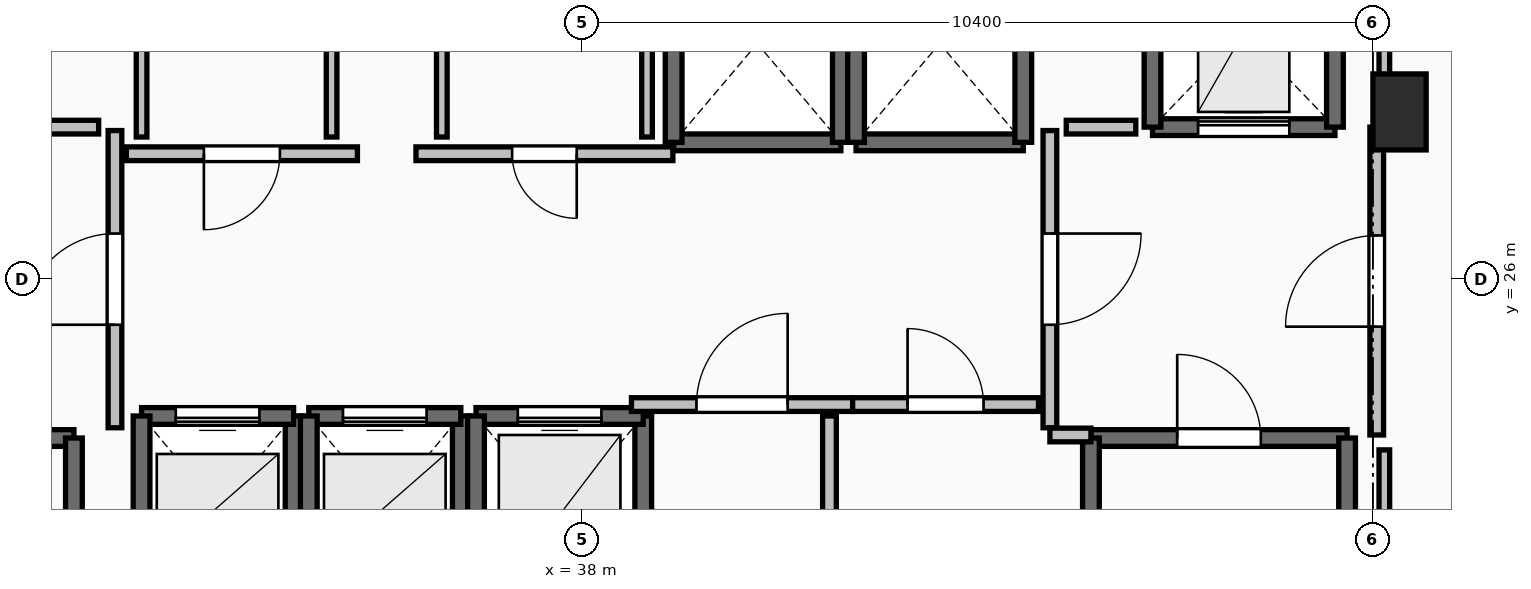
"""IFC4 building model, lengths in metres.
Left out: names, types, materials, properties, quantities, classifications, styles, units other than length and angle.
Written with IfcOpenShell. Run it as: python <this file> out.ifc"""

import sys

from ifc_helpers import new_model, si_unit, direction, frame, frame_2d, origin, origin_2d, place, context, subcontext, project, spatial, rectangle, extrude, element, fill, save


model = new_model("IFC4")
c1 = context("Model", 3, precision=1e-05, world=origin(), true_north=direction((0.0, 1.0)))
c2 = subcontext(c1, "Body", "Model", "MODEL_VIEW")
j1 = project(units=[si_unit("LENGTHUNIT", "METRE"), si_unit("PLANEANGLEUNIT", "RADIAN")], contexts=[c1])
p1 = place(None, origin())
s1 = spatial("IfcSite", under=j1, at=p1, CompositionType="ELEMENT")
p2 = place(p1, origin())
s2 = spatial("IfcBuilding", under=s1, at=p2, CompositionType="ELEMENT")
p3 = place(p2, frame((0.0, 0.0, 186.1)))
s3 = spatial("IfcBuildingStorey", under=s2, at=p3, CompositionType="ELEMENT", Elevation=186.1)
p4 = place(p3, frame((48.75, 28.2, 0.0), z_axis=(0.0, 0.0, 1.0), x_axis=(1.0, 0.0, 0.0)))
e1 = element("IfcColumn", 1, at=p4, inside=s3, PredefinedType="PILASTER", context=c2, shape_type="SweptSolid", body=[
    extrude(rectangle(XDim=0.7, YDim=1.0, at=origin_2d()), origin(), (0.0, 0.0, 1.0), 3.5),
])
p5 = place(p3, frame((27.94, 23.91, 0.0), z_axis=(0.0, 0.0, 1.0), x_axis=(1.0, 0.0, 0.0)))
e2 = element("IfcWall", 2, at=p5, inside=s3, PredefinedType="SOLIDWALL", context=c2, shape_type="SweptSolid", body=[
    extrude(rectangle(XDim=3.37, YDim=0.22, at=frame_2d((1.685, 0.0))), origin(), (0.0, 0.0, 1.0), 3.24),
])
p6 = place(p5, frame((1.135, 0.0, 0.0)))
e3 = element("IfcOpeningElement", 3, at=p6, cuts=e2, PredefinedType="OPENING", context=c2, shape_type="SweptSolid", body=[
    extrude(rectangle(XDim=1.1, YDim=2.15, at=frame_2d((0.55, 1.075))), frame((0.0, 0.125, 0.0), z_axis=(0.0, -1.0, 0.0), x_axis=(1.0, 0.0, 0.0)), (0.0, 0.0, 1.0), 0.25),
])
p7 = place(p3, frame((31.31, 23.91, 0.0), z_axis=(0.0, 0.0, 1.0), x_axis=(0.0, -1.0, 0.0)))
e4 = element("IfcWall", 4, at=p7, inside=s3, PredefinedType="SOLIDWALL", context=c2, shape_type="SweptSolid", body=[
    extrude(rectangle(XDim=7.42, YDim=0.22, at=frame_2d((3.71, 0.0))), origin(), (0.0, 0.0, 1.0), 3.24),
])
p8 = place(p3, frame((44.69, 23.91, 0.0), z_axis=(0.0, 0.0, 1.0), x_axis=(1.0, 0.0, 0.0)))
e5 = element("IfcWall", 5, at=p8, inside=s3, PredefinedType="SOLIDWALL", context=c2, shape_type="SweptSolid", body=[
    extrude(rectangle(XDim=3.37, YDim=0.22, at=frame_2d((1.685, 0.0))), origin(), (0.0, 0.0, 1.0), 3.24),
])
p9 = place(p8, frame((1.135, 0.0, 0.0)))
e6 = element("IfcOpeningElement", 6, at=p9, cuts=e5, PredefinedType="OPENING", context=c2, shape_type="SweptSolid", body=[
    extrude(rectangle(XDim=1.1, YDim=2.15, at=frame_2d((0.55, 1.075))), frame((0.0, 0.125, 0.0), z_axis=(0.0, -1.0, 0.0), x_axis=(1.0, 0.0, 0.0)), (0.0, 0.0, 1.0), 0.25),
])
for number, where, z_axis, x_axis in (
    (7, (48.06, 23.91, 0.0), (0.0, 0.0, 1.0), (0.0, -1.0, 0.0)),
    (8, (44.69, 16.49, 0.0), (0.0, 0.0, 1.0), (0.0, 1.0, 0.0)),
):
    element("IfcWall", number, at=place(p3, frame(where, z_axis=z_axis, x_axis=x_axis)), inside=s3, PredefinedType="SOLIDWALL", context=c2, shape_type="SweptSolid", body=[
        extrude(rectangle(XDim=7.42, YDim=0.22, at=frame_2d((3.71, 0.0))), origin(), (0.0, 0.0, 1.0), 3.24),
    ])
p10 = place(p3, frame((34.2, 21.8, 0.0), z_axis=(0.0, 0.0, 1.0), x_axis=(0.0, 1.0, 0.0)))
e9 = element("IfcWall", 9, at=p10, inside=s3, PredefinedType="SOLIDWALL", context=c2, shape_type="SweptSolid", body=[
    extrude(rectangle(XDim=2.4, YDim=0.22, at=frame_2d((1.2, 0.0))), origin(), (0.0, 0.0, 1.0), 3.24),
])
p11 = place(p3, frame((34.2, 24.2, 0.0), z_axis=(0.0, 0.0, 1.0), x_axis=(-1.0, 0.0, 0.0)))
e10 = element("IfcWall", 10, at=p11, inside=s3, PredefinedType="SOLIDWALL", context=c2, shape_type="SweptSolid", body=[
    extrude(rectangle(XDim=2.0, YDim=0.22, at=frame_2d((1.0, 0.0))), origin(), (0.0, 0.0, 1.0), 3.24),
])
p12 = place(p11, frame((0.45, 0.0, 0.0)))
e11 = element("IfcOpeningElement", 11, at=p12, cuts=e10, PredefinedType="OPENING", context=c2, shape_type="SweptSolid", body=[
    extrude(rectangle(XDim=1.1, YDim=2.2, at=frame_2d((0.55, 1.1))), frame((0.0, 0.125, 0.0), z_axis=(0.0, -1.0, 0.0), x_axis=(1.0, 0.0, 0.0)), (0.0, 0.0, 1.0), 0.25),
])
for number, where, z_axis, x_axis in (
    (12, (32.2, 24.2, 0.0), (0.0, 0.0, 1.0), (0.0, -1.0, 0.0)),
    (13, (36.4, 21.8, 0.0), (0.0, 0.0, 1.0), (0.0, 1.0, 0.0)),
):
    element("IfcWall", number, at=place(p3, frame(where, z_axis=z_axis, x_axis=x_axis)), inside=s3, PredefinedType="SOLIDWALL", context=c2, shape_type="SweptSolid", body=[
        extrude(rectangle(XDim=2.4, YDim=0.22, at=frame_2d((1.2, 0.0))), origin(), (0.0, 0.0, 1.0), 3.24),
    ])
p13 = place(p3, frame((36.4, 24.2, 0.0), z_axis=(0.0, 0.0, 1.0), x_axis=(-1.0, 0.0, 0.0)))
e14 = element("IfcWall", 14, at=p13, inside=s3, PredefinedType="SOLIDWALL", context=c2, shape_type="SweptSolid", body=[
    extrude(rectangle(XDim=2.0, YDim=0.22, at=frame_2d((1.0, 0.0))), origin(), (0.0, 0.0, 1.0), 3.24),
])
p14 = place(p13, frame((0.45, 0.0, 0.0)))
e15 = element("IfcOpeningElement", 15, at=p14, cuts=e14, PredefinedType="OPENING", context=c2, shape_type="SweptSolid", body=[
    extrude(rectangle(XDim=1.1, YDim=2.2, at=frame_2d((0.55, 1.1))), frame((0.0, 0.125, 0.0), z_axis=(0.0, -1.0, 0.0), x_axis=(1.0, 0.0, 0.0)), (0.0, 0.0, 1.0), 0.25),
])
p15 = place(p3, frame((34.4, 24.2, 0.0), z_axis=(0.0, 0.0, 1.0), x_axis=(0.0, -1.0, 0.0)))
e16 = element("IfcWall", 16, at=p15, inside=s3, PredefinedType="SOLIDWALL", context=c2, shape_type="SweptSolid", body=[
    extrude(rectangle(XDim=2.4, YDim=0.22, at=frame_2d((1.2, 0.0))), origin(), (0.0, 0.0, 1.0), 3.24),
])
p16 = place(p3, frame((38.8, 21.6, 0.0), z_axis=(0.0, 0.0, 1.0), x_axis=(0.0, 1.0, 0.0)))
e17 = element("IfcWall", 17, at=p16, inside=s3, PredefinedType="SOLIDWALL", context=c2, shape_type="SweptSolid", body=[
    extrude(rectangle(XDim=2.6, YDim=0.22, at=frame_2d((1.3, 0.0))), origin(), (0.0, 0.0, 1.0), 3.24),
])
p17 = place(p3, frame((38.8, 24.2, 0.0), z_axis=(0.0, 0.0, 1.0), x_axis=(-1.0, 0.0, 0.0)))
e18 = element("IfcWall", 18, at=p17, inside=s3, PredefinedType="SOLIDWALL", context=c2, shape_type="SweptSolid", body=[
    extrude(rectangle(XDim=2.2, YDim=0.22, at=frame_2d((1.1, 0.0))), origin(), (0.0, 0.0, 1.0), 3.24),
])
p18 = place(p17, frame((0.55, 0.0, 0.0)))
e19 = element("IfcOpeningElement", 19, at=p18, cuts=e18, PredefinedType="OPENING", context=c2, shape_type="SweptSolid", body=[
    extrude(rectangle(XDim=1.1, YDim=2.2, at=frame_2d((0.55, 1.1))), frame((0.0, 0.125, 0.0), z_axis=(0.0, -1.0, 0.0), x_axis=(1.0, 0.0, 0.0)), (0.0, 0.0, 1.0), 0.25),
])
p19 = place(p3, frame((36.6, 24.2, 0.0), z_axis=(0.0, 0.0, 1.0), x_axis=(0.0, -1.0, 0.0)))
e20 = element("IfcWall", 20, at=p19, inside=s3, PredefinedType="SOLIDWALL", context=c2, shape_type="SweptSolid", body=[
    extrude(rectangle(XDim=2.6, YDim=0.22, at=frame_2d((1.3, 0.0))), origin(), (0.0, 0.0, 1.0), 3.24),
])
p20 = place(p3, frame((39.2, 27.8, 0.0), z_axis=(0.0, 0.0, 1.0), x_axis=(1.0, 0.0, 0.0)))
e21 = element("IfcWall", 21, at=p20, inside=s3, PredefinedType="SOLIDWALL", context=c2, shape_type="SweptSolid", body=[
    extrude(rectangle(XDim=2.2, YDim=0.22, at=frame_2d((1.1, 0.0))), origin(), (0.0, 0.0, 1.0), 3.24),
])
for number, where, z_axis, x_axis in (
    (22, (41.4, 27.8, 0.0), (0.0, 0.0, 1.0), (0.0, 1.0, 0.0)),
    (23, (39.2, 30.4, 0.0), (0.0, 0.0, 1.0), (0.0, -1.0, 0.0)),
):
    element("IfcWall", number, at=place(p3, frame(where, z_axis=z_axis, x_axis=x_axis)), inside=s3, PredefinedType="SOLIDWALL", context=c2, shape_type="SweptSolid", body=[
        extrude(rectangle(XDim=2.6, YDim=0.22, at=frame_2d((1.3, 0.0))), origin(), (0.0, 0.0, 1.0), 3.24),
    ])
p21 = place(p3, frame((41.6, 27.8, 0.0), z_axis=(0.0, 0.0, 1.0), x_axis=(1.0, 0.0, 0.0)))
e24 = element("IfcWall", 24, at=p21, inside=s3, PredefinedType="SOLIDWALL", context=c2, shape_type="SweptSolid", body=[
    extrude(rectangle(XDim=2.2, YDim=0.22, at=frame_2d((1.1, 0.0))), origin(), (0.0, 0.0, 1.0), 3.24),
])
for number, where, z_axis, x_axis in (
    (25, (43.8, 27.8, 0.0), (0.0, 0.0, 1.0), (0.0, 1.0, 0.0)),
    (26, (41.6, 30.4, 0.0), (0.0, 0.0, 1.0), (0.0, -1.0, 0.0)),
):
    element("IfcWall", number, at=place(p3, frame(where, z_axis=z_axis, x_axis=x_axis)), inside=s3, PredefinedType="SOLIDWALL", context=c2, shape_type="SweptSolid", body=[
        extrude(rectangle(XDim=2.6, YDim=0.22, at=frame_2d((1.3, 0.0))), origin(), (0.0, 0.0, 1.0), 3.24),
    ])
p22 = place(p3, frame((45.5, 28.0, 0.0), z_axis=(0.0, 0.0, 1.0), x_axis=(1.0, 0.0, 0.0)))
e27 = element("IfcWall", 27, at=p22, inside=s3, PredefinedType="SHEAR", context=c2, shape_type="SweptSolid", body=[
    extrude(rectangle(XDim=2.4, YDim=0.22, at=frame_2d((1.2, 0.0))), origin(), (0.0, 0.0, 1.0), 3.24),
])
p23 = place(p22, frame((0.6, 0.0, 0.0)))
e28 = element("IfcOpeningElement", 28, at=p23, cuts=e27, PredefinedType="OPENING", context=c2, shape_type="SweptSolid", body=[
    extrude(rectangle(XDim=1.2, YDim=2.2, at=frame_2d((0.6, 1.1))), frame((0.0, 0.125, 0.0), z_axis=(0.0, -1.0, 0.0), x_axis=(1.0, 0.0, 0.0)), (0.0, 0.0, 1.0), 0.25),
])
for number, where, z_axis, x_axis in (
    (29, (47.9, 28.0, 0.0), (0.0, 0.0, 1.0), (0.0, 1.0, 0.0)),
    (30, (45.5, 30.5, 0.0), (0.0, 0.0, 1.0), (0.0, -1.0, 0.0)),
):
    element("IfcWall", number, at=place(p3, frame(where, z_axis=z_axis, x_axis=x_axis)), inside=s3, PredefinedType="SHEAR", context=c2, shape_type="SweptSolid", body=[
        extrude(rectangle(XDim=2.5, YDim=0.22, at=frame_2d((1.25, 0.0))), origin(), (0.0, 0.0, 1.0), 3.24),
    ])
p24 = place(p3, frame((31.85, 24.045, 0.0), z_axis=(0.0, 0.0, 1.0), x_axis=(0.0, 1.0, 0.0)))
e31 = element("IfcWall", 31, at=p24, inside=s3, PredefinedType="PARTITIONING", context=c2, shape_type="SweptSolid", body=[
    extrude(rectangle(XDim=3.91, YDim=0.18, at=frame_2d((1.955, 0.0))), origin(), (0.0, 0.0, 1.0), 3.24),
])
p25 = place(p24, frame((1.355, 0.0, 0.0)))
e32 = element("IfcOpeningElement", 32, at=p25, cuts=e31, PredefinedType="OPENING", context=c2, shape_type="SweptSolid", body=[
    extrude(rectangle(XDim=1.2, YDim=2.15, at=frame_2d((0.6, 1.075))), frame((0.0, 0.105, 0.0), z_axis=(0.0, -1.0, 0.0), x_axis=(1.0, 0.0, 0.0)), (0.0, 0.0, 1.0), 0.21),
])
p26 = place(p3, frame((44.15, 27.955, 0.0), z_axis=(0.0, 0.0, 1.0), x_axis=(0.0, -1.0, 0.0)))
e33 = element("IfcWall", 33, at=p26, inside=s3, PredefinedType="PARTITIONING", context=c2, shape_type="SweptSolid", body=[
    extrude(rectangle(XDim=3.91, YDim=0.18, at=frame_2d((1.955, 0.0))), origin(), (0.0, 0.0, 1.0), 3.24),
])
p27 = place(p26, frame((1.355, 0.0, 0.0)))
e34 = element("IfcOpeningElement", 34, at=p27, cuts=e33, PredefinedType="OPENING", context=c2, shape_type="SweptSolid", body=[
    extrude(rectangle(XDim=1.2, YDim=2.15, at=frame_2d((0.6, 1.075))), frame((0.0, 0.105, 0.0), z_axis=(0.0, -1.0, 0.0), x_axis=(1.0, 0.0, 0.0)), (0.0, 0.0, 1.0), 0.21),
])
p28 = place(p3, frame((44.15, 23.95, 0.0), z_axis=(0.0, 0.0, 1.0), x_axis=(1.0, 0.0, 0.0)))
e35 = element("IfcWall", 35, at=p28, inside=s3, PredefinedType="PARTITIONING", context=c2, shape_type="SweptSolid", body=[
    extrude(rectangle(XDim=0.54, YDim=0.18, at=frame_2d((0.27, 0.0))), origin(), (0.0, 0.0, 1.0), 3.24),
])
p29 = place(p3, frame((48.45, 23.95, 0.0), z_axis=(0.0, 0.0, 1.0), x_axis=(0.0, 1.0, 0.0)))
e36 = element("IfcWall", 36, at=p29, inside=s3, PredefinedType="PARTITIONING", context=c2, shape_type="SweptSolid", body=[
    extrude(rectangle(XDim=4.05, YDim=0.18, at=frame_2d((2.025, 0.0))), origin(), (0.0, 0.0, 1.0), 3.24),
])
p30 = place(p29, frame((1.425, 0.0, 0.0)))
e37 = element("IfcOpeningElement", 37, at=p30, cuts=e36, PredefinedType="OPENING", context=c2, shape_type="SweptSolid", body=[
    extrude(rectangle(XDim=1.2, YDim=2.15, at=frame_2d((0.6, 1.075))), frame((0.0, 0.105, 0.0), z_axis=(0.0, -1.0, 0.0), x_axis=(1.0, 0.0, 0.0)), (0.0, 0.0, 1.0), 0.21),
])
p31 = place(p3, frame((38.645, 24.35, 0.0), z_axis=(0.0, 0.0, 1.0), x_axis=(1.0, 0.0, 0.0)))
e38 = element("IfcWall", 38, at=p31, inside=s3, PredefinedType="PARTITIONING", context=c2, shape_type="SweptSolid", body=[
    extrude(rectangle(XDim=2.91, YDim=0.18, at=frame_2d((1.455, 0.0))), origin(), (0.0, 0.0, 1.0), 3.24),
])
p32 = place(p31, frame((0.855, 0.0, 0.0)))
e39 = element("IfcOpeningElement", 39, at=p32, cuts=e38, PredefinedType="OPENING", context=c2, shape_type="SweptSolid", body=[
    extrude(rectangle(XDim=1.2, YDim=2.15, at=frame_2d((0.6, 1.075))), frame((0.0, 0.105, 0.0), z_axis=(0.0, -1.0, 0.0), x_axis=(1.0, 0.0, 0.0)), (0.0, 0.0, 1.0), 0.21),
])
p33 = place(p3, frame((41.555, 24.35, 0.0), z_axis=(0.0, 0.0, 1.0), x_axis=(1.0, 0.0, 0.0)))
e40 = element("IfcWall", 40, at=p33, inside=s3, PredefinedType="PARTITIONING", context=c2, shape_type="SweptSolid", body=[
    extrude(rectangle(XDim=2.445, YDim=0.18, at=frame_2d((1.223, 0.0))), origin(), (0.0, 0.0, 1.0), 3.24),
])
p34 = place(p33, frame((0.722, 0.0, 0.0)))
e41 = element("IfcOpeningElement", 41, at=p34, cuts=e40, PredefinedType="OPENING", context=c2, shape_type="SweptSolid", body=[
    extrude(rectangle(XDim=1.0, YDim=2.15, at=frame_2d((0.5, 1.075))), frame((0.0, 0.105, 0.0), z_axis=(0.0, -1.0, 0.0), x_axis=(1.0, 0.0, 0.0)), (0.0, 0.0, 1.0), 0.21),
])
p35 = place(p3, frame((35.04, 27.65, 0.0), z_axis=(0.0, 0.0, 1.0), x_axis=(-1.0, 0.0, 0.0)))
e42 = element("IfcWall", 42, at=p35, inside=s3, PredefinedType="PARTITIONING", context=c2, shape_type="SweptSolid", body=[
    extrude(rectangle(XDim=3.04, YDim=0.18, at=frame_2d((1.52, 0.0))), origin(), (0.0, 0.0, 1.0), 3.24),
])
p36 = place(p35, frame((1.02, 0.0, 0.0)))
e43 = element("IfcOpeningElement", 43, at=p36, cuts=e42, PredefinedType="OPENING", context=c2, shape_type="SweptSolid", body=[
    extrude(rectangle(XDim=1.0, YDim=2.15, at=frame_2d((0.5, 1.075))), frame((0.0, 0.105, 0.0), z_axis=(0.0, -1.0, 0.0), x_axis=(1.0, 0.0, 0.0)), (0.0, 0.0, 1.0), 0.21),
])
p37 = place(p3, frame((39.19, 27.65, 0.0), z_axis=(0.0, 0.0, 1.0), x_axis=(-1.0, 0.0, 0.0)))
e44 = element("IfcWall", 44, at=p37, inside=s3, PredefinedType="PARTITIONING", context=c2, shape_type="SweptSolid", body=[
    extrude(rectangle(XDim=3.38, YDim=0.18, at=frame_2d((1.69, 0.0))), origin(), (0.0, 0.0, 1.0), 3.24),
])
p38 = place(p37, frame((1.265, 0.0, 0.0)))
e45 = element("IfcOpeningElement", 45, at=p38, cuts=e44, PredefinedType="OPENING", context=c2, shape_type="SweptSolid", body=[
    extrude(rectangle(XDim=0.85, YDim=2.1, at=frame_2d((0.425, 1.05))), frame((0.0, 0.105, 0.0), z_axis=(0.0, -1.0, 0.0), x_axis=(1.0, 0.0, 0.0)), (0.0, 0.0, 1.0), 0.21),
])
p39 = place(p3, frame((41.25, 20.305, 0.0), z_axis=(0.0, 0.0, 1.0), x_axis=(0.0, 1.0, 0.0)))
e46 = element("IfcWall", 46, at=p39, inside=s3, PredefinedType="PARTITIONING", context=c2, shape_type="SweptSolid", body=[
    extrude(rectangle(XDim=3.895, YDim=0.18, at=frame_2d((1.948, 0.0))), origin(), (0.0, 0.0, 1.0), 3.24),
])
p40 = place(p39, frame((1.448, 0.0, 0.0)))
e47 = element("IfcOpeningElement", 47, at=p40, cuts=e46, PredefinedType="OPENING", context=c2, shape_type="SweptSolid", body=[
    extrude(rectangle(XDim=1.0, YDim=2.15, at=frame_2d((0.5, 1.075))), frame((0.0, 0.105, 0.0), z_axis=(0.0, -1.0, 0.0), x_axis=(1.0, 0.0, 0.0)), (0.0, 0.0, 1.0), 0.21),
])
for number, where, z_axis, x_axis in (
    (48, (31.635, 28.0, 0.0), (0.0, 0.0, 1.0), (-1.0, 0.0, 0.0)),
    (49, (45.28, 28.0, 0.0), (0.0, 0.0, 1.0), (-1.0, 0.0, 0.0)),
):
    element("IfcWall", number, at=place(p3, frame(where, z_axis=z_axis, x_axis=x_axis)), inside=s3, PredefinedType="PARTITIONING", context=c2, shape_type="SweptSolid", body=[
        extrude(rectangle(XDim=0.915, YDim=0.18, at=frame_2d((0.458, 0.0))), origin(), (0.0, 0.0, 1.0), 3.24),
    ])
for number, where, z_axis, x_axis in (
    (50, (32.2, 30.26, 0.0), (0.0, 0.0, 1.0), (0.0, -1.0, 0.0)),
    (51, (34.7, 27.87, 0.0), (0.0, 0.0, 1.0), (0.0, 1.0, 0.0)),
    (52, (36.15, 30.26, 0.0), (0.0, 0.0, 1.0), (0.0, -1.0, 0.0)),
    (53, (38.85, 27.87, 0.0), (0.0, 0.0, 1.0), (0.0, 1.0, 0.0)),
):
    element("IfcWall", number, at=place(p3, frame(where, z_axis=z_axis, x_axis=x_axis)), inside=s3, PredefinedType="PARTITIONING", context=c2, shape_type="SweptSolid", body=[
        extrude(rectangle(XDim=2.39, YDim=0.14, at=frame_2d((1.195, 0.0))), origin(), (0.0, 0.0, 1.0), 3.24),
    ])
p41 = place(p3, frame((48.55, 28.196, 0.0), z_axis=(0.0, 0.0, 1.0), x_axis=(0.0, 1.0, 0.0)))
e54 = element("IfcWall", 54, at=p41, inside=s3, PredefinedType="PARTITIONING", context=c2, shape_type="SweptSolid", body=[
    extrude(rectangle(XDim=5.254, YDim=0.14, at=frame_2d((2.627, 0.0))), origin(), (0.0, 0.0, 1.0), 2.432),
])
p42 = place(p3, frame((48.55, 16.24, 0.0), z_axis=(0.0, 0.0, 1.0), x_axis=(0.0, 1.0, 0.0)))
e55 = element("IfcWall", 55, at=p42, inside=s3, PredefinedType="PARTITIONING", context=c2, shape_type="SweptSolid", body=[
    extrude(rectangle(XDim=7.514, YDim=0.14, at=frame_2d((3.757, 0.0))), origin(), (0.0, 0.0, 1.0), 2.432),
])
p43 = place(p9, origin())
e56 = element("IfcDoor", 56, at=p43, inside=s3, OperationType="SINGLE_SWING_LEFT", PredefinedType="DOOR", context=c2, shape_type="SweptSolid", body=[
    extrude(rectangle(XDim=1.1, YDim=2.15, at=frame_2d((0.55, 1.075))), frame((0.0, 0.025, 0.0), z_axis=(0.0, -1.0, 0.0), x_axis=(1.0, 0.0, 0.0)), (0.0, 0.0, 1.0), 0.05),
])
fill(e6, e56)
p44 = place(p12, origin())
e57 = element("IfcDoor", 57, at=p44, inside=s3, OperationType="SLIDING_TO_LEFT", PredefinedType="DOOR", context=c2, shape_type="SweptSolid", body=[
    extrude(rectangle(XDim=1.1, YDim=2.2, at=frame_2d((0.55, 1.1))), frame((0.0, 0.025, 0.0), z_axis=(0.0, -1.0, 0.0), x_axis=(1.0, 0.0, 0.0)), (0.0, 0.0, 1.0), 0.05),
])
fill(e11, e57)
p45 = place(p14, origin())
e58 = element("IfcDoor", 58, at=p45, inside=s3, OperationType="SLIDING_TO_LEFT", PredefinedType="DOOR", context=c2, shape_type="SweptSolid", body=[
    extrude(rectangle(XDim=1.1, YDim=2.2, at=frame_2d((0.55, 1.1))), frame((0.0, 0.025, 0.0), z_axis=(0.0, -1.0, 0.0), x_axis=(1.0, 0.0, 0.0)), (0.0, 0.0, 1.0), 0.05),
])
fill(e15, e58)
p46 = place(p18, origin())
e59 = element("IfcDoor", 59, at=p46, inside=s3, OperationType="SLIDING_TO_LEFT", PredefinedType="DOOR", context=c2, shape_type="SweptSolid", body=[
    extrude(rectangle(XDim=1.1, YDim=2.2, at=frame_2d((0.55, 1.1))), frame((0.0, 0.025, 0.0), z_axis=(0.0, -1.0, 0.0), x_axis=(1.0, 0.0, 0.0)), (0.0, 0.0, 1.0), 0.05),
])
fill(e19, e59)
p47 = place(p23, origin())
e60 = element("IfcDoor", 60, at=p47, inside=s3, OperationType="SLIDING_TO_LEFT", PredefinedType="DOOR", context=c2, shape_type="SweptSolid", body=[
    extrude(rectangle(XDim=1.2, YDim=2.2, at=frame_2d((0.6, 1.1))), frame((0.0, 0.025, 0.0), z_axis=(0.0, -1.0, 0.0), x_axis=(1.0, 0.0, 0.0)), (0.0, 0.0, 1.0), 0.05),
])
fill(e28, e60)
p48 = place(p25, origin())
e61 = element("IfcDoor", 61, at=p48, inside=s3, OperationType="SINGLE_SWING_LEFT", PredefinedType="DOOR", context=c2, shape_type="SweptSolid", body=[
    extrude(rectangle(XDim=1.2, YDim=2.15, at=frame_2d((0.6, 1.075))), frame((0.0, 0.025, 0.0), z_axis=(0.0, -1.0, 0.0), x_axis=(1.0, 0.0, 0.0)), (0.0, 0.0, 1.0), 0.05),
])
fill(e32, e61)
p49 = place(p27, origin())
e62 = element("IfcDoor", 62, at=p49, inside=s3, OperationType="SINGLE_SWING_LEFT", PredefinedType="DOOR", context=c2, shape_type="SweptSolid", body=[
    extrude(rectangle(XDim=1.2, YDim=2.15, at=frame_2d((0.6, 1.075))), frame((0.0, 0.025, 0.0), z_axis=(0.0, -1.0, 0.0), x_axis=(1.0, 0.0, 0.0)), (0.0, 0.0, 1.0), 0.05),
])
fill(e34, e62)
p50 = place(p30, origin())
e63 = element("IfcDoor", 63, at=p50, inside=s3, OperationType="SINGLE_SWING_LEFT", PredefinedType="DOOR", context=c2, shape_type="SweptSolid", body=[
    extrude(rectangle(XDim=1.2, YDim=2.15, at=frame_2d((0.6, 1.075))), frame((0.0, 0.025, 0.0), z_axis=(0.0, -1.0, 0.0), x_axis=(1.0, 0.0, 0.0)), (0.0, 0.0, 1.0), 0.05),
])
fill(e37, e63)
p51 = place(p32, origin())
e64 = element("IfcDoor", 64, at=p51, inside=s3, OperationType="SINGLE_SWING_RIGHT", PredefinedType="DOOR", context=c2, shape_type="SweptSolid", body=[
    extrude(rectangle(XDim=1.2, YDim=2.15, at=frame_2d((0.6, 1.075))), frame((0.0, 0.025, 0.0), z_axis=(0.0, -1.0, 0.0), x_axis=(1.0, 0.0, 0.0)), (0.0, 0.0, 1.0), 0.05),
])
fill(e39, e64)
p52 = place(p34, origin())
e65 = element("IfcDoor", 65, at=p52, inside=s3, OperationType="SINGLE_SWING_LEFT", PredefinedType="DOOR", context=c2, shape_type="SweptSolid", body=[
    extrude(rectangle(XDim=1.0, YDim=2.15, at=frame_2d((0.5, 1.075))), frame((0.0, 0.025, 0.0), z_axis=(0.0, -1.0, 0.0), x_axis=(1.0, 0.0, 0.0)), (0.0, 0.0, 1.0), 0.05),
])
fill(e41, e65)
p53 = place(p36, origin())
e66 = element("IfcDoor", 66, at=p53, inside=s3, OperationType="SINGLE_SWING_RIGHT", PredefinedType="DOOR", context=c2, shape_type="SweptSolid", body=[
    extrude(rectangle(XDim=1.0, YDim=2.15, at=frame_2d((0.5, 1.075))), frame((0.0, 0.025, 0.0), z_axis=(0.0, -1.0, 0.0), x_axis=(1.0, 0.0, 0.0)), (0.0, 0.0, 1.0), 0.05),
])
fill(e43, e66)
p54 = place(p38, origin())
e67 = element("IfcDoor", 67, at=p54, inside=s3, OperationType="SINGLE_SWING_LEFT", PredefinedType="DOOR", context=c2, shape_type="SweptSolid", body=[
    extrude(rectangle(XDim=0.85, YDim=2.1, at=frame_2d((0.425, 1.05))), frame((0.0, 0.025, 0.0), z_axis=(0.0, -1.0, 0.0), x_axis=(1.0, 0.0, 0.0)), (0.0, 0.0, 1.0), 0.05),
])
fill(e45, e67)
save(model, sys.argv[1])
